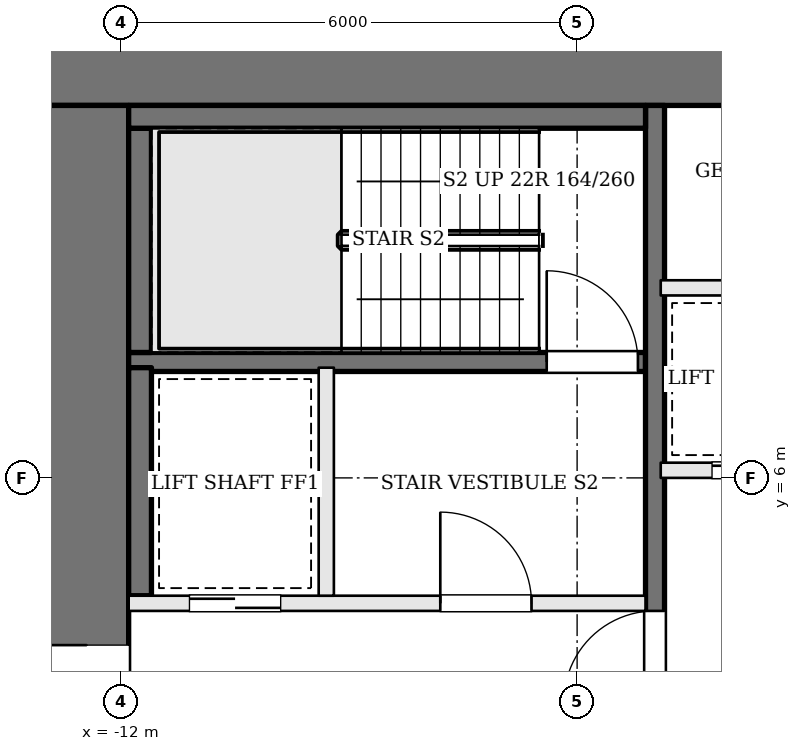
"""IFC4 building model, lengths in metres.
Left out: names, types, materials, properties, quantities, classifications, styles, units other than length and angle.
Written with IfcOpenShell. Run it as: python <this file> out.ifc"""

import sys

from ifc_helpers import new_model, si_unit, direction, frame, frame_2d, origin, place, context, subcontext, project, spatial, rectangle, extrude, element, fill, save


model = new_model("IFC4")
c1 = context("Model", 3, precision=1e-05, world=origin(), true_north=direction((0.0, 1.0)))
c2 = subcontext(c1, "Body", "Model", "MODEL_VIEW")
j1 = project(units=[si_unit("LENGTHUNIT", "METRE"), si_unit("PLANEANGLEUNIT", "RADIAN")], contexts=[c1])
p1 = place(None, origin())
s1 = spatial("IfcSite", under=j1, at=p1, CompositionType="ELEMENT")
p2 = place(p1, origin())
s2 = spatial("IfcBuilding", under=s1, at=p2, CompositionType="ELEMENT")
p3 = place(p2, frame((0.0, 0.0, 114.0)))
s3 = spatial("IfcBuildingStorey", under=s2, at=p3, CompositionType="ELEMENT", Elevation=114.0)
p4 = place(p3, frame((-13.0, 11.45, 0.0), z_axis=(0.0, 0.0, 1.0), x_axis=(1.0, 0.0, 0.0)))
e1 = element("IfcWall", 1, at=p4, inside=s3, PredefinedType="SHEAR", context=c2, shape_type="SweptSolid", body=[
    extrude(rectangle(XDim=26.0, YDim=1.1, at=frame_2d((13.0, 0.0))), origin(), (0.0, 0.0, 1.0), 3.6),
])
p5 = place(p4, frame((9.225, 0.0, 0.0)))
e2 = element("IfcOpeningElement", 2, at=p5, cuts=e1, PredefinedType="OPENING", context=c2, shape_type="SweptSolid", body=[
    extrude(rectangle(XDim=1.0, YDim=2.1, at=frame_2d((0.5, 1.05))), frame((0.0, 0.56, 0.0), z_axis=(0.0, -1.0, 0.0), x_axis=(1.0, 0.0, 0.0)), (0.0, 0.0, 1.0), 1.12),
])
p6 = place(p4, frame((11.825, 0.0, 0.0)))
e3 = element("IfcOpeningElement", 3, at=p6, cuts=e1, PredefinedType="OPENING", context=c2, shape_type="SweptSolid", body=[
    extrude(rectangle(XDim=0.7, YDim=2.1, at=frame_2d((0.35, 1.05))), frame((0.0, 0.56, 0.0), z_axis=(0.0, -1.0, 0.0), x_axis=(1.0, 0.0, 0.0)), (0.0, 0.0, 1.0), 1.12),
])
p7 = place(p4, frame((13.725, 0.0, 0.0)))
e4 = element("IfcOpeningElement", 4, at=p7, cuts=e1, PredefinedType="OPENING", context=c2, shape_type="SweptSolid", body=[
    extrude(rectangle(XDim=1.0, YDim=2.1, at=frame_2d((0.5, 1.05))), frame((0.0, 0.56, 0.0), z_axis=(0.0, -1.0, 0.0), x_axis=(1.0, 0.0, 0.0)), (0.0, 0.0, 1.0), 1.12),
])
p8 = place(p4, frame((16.225, 0.0, 0.0)))
e5 = element("IfcOpeningElement", 5, at=p8, cuts=e1, PredefinedType="OPENING", context=c2, shape_type="SweptSolid", body=[
    extrude(rectangle(XDim=0.9, YDim=2.1, at=frame_2d((0.45, 1.05))), frame((0.0, 0.56, 0.0), z_axis=(0.0, -1.0, 0.0), x_axis=(1.0, 0.0, 0.0)), (0.0, 0.0, 1.0), 1.12),
])
p9 = place(p3, frame((-12.45, -1.9, 0.0), z_axis=(0.0, 0.0, 1.0), x_axis=(0.0, 1.0, 0.0)))
e6 = element("IfcWall", 6, at=p9, inside=s3, PredefinedType="SHEAR", context=c2, shape_type="SweptSolid", body=[
    extrude(rectangle(XDim=12.8, YDim=1.1, at=frame_2d((6.4, 0.0))), origin(), (0.0, 0.0, 1.0), 3.6),
])
p10 = place(p9, frame((3.9, 0.0, 0.0)))
e7 = element("IfcOpeningElement", 7, at=p10, cuts=e6, PredefinedType="OPENING", context=c2, shape_type="SweptSolid", body=[
    extrude(rectangle(XDim=1.8, YDim=2.1, at=frame_2d((0.9, 1.05))), frame((0.0, 0.56, 0.0), z_axis=(0.0, -1.0, 0.0), x_axis=(1.0, 0.0, 0.0)), (0.0, 0.0, 1.0), 1.12),
])
p11 = place(p3, frame((-11.9, 4.35, 0.0), z_axis=(0.0, 0.0, 1.0), x_axis=(1.0, 0.0, 0.0)))
e8 = element("IfcWall", 8, at=p11, inside=s3, PredefinedType="SOLIDWALL", context=c2, shape_type="SweptSolid", body=[
    extrude(rectangle(XDim=6.8, YDim=0.2, at=frame_2d((3.4, 0.0))), origin(), (0.0, 0.0, 1.0), 3.4),
])
p12 = place(p11, frame((4.1, 0.0, 0.0)))
e9 = element("IfcOpeningElement", 9, at=p12, cuts=e8, PredefinedType="OPENING", context=c2, shape_type="SweptSolid", body=[
    extrude(rectangle(XDim=1.2, YDim=2.1, at=frame_2d((0.6, 1.05))), frame((0.0, 0.11, 0.0), z_axis=(0.0, -1.0, 0.0), x_axis=(1.0, 0.0, 0.0)), (0.0, 0.0, 1.0), 0.22),
])
p13 = place(p11, frame((0.8, 0.0, 0.0)))
e10 = element("IfcOpeningElement", 10, at=p13, cuts=e8, PredefinedType="OPENING", context=c2, shape_type="SweptSolid", body=[
    extrude(rectangle(XDim=1.2, YDim=2.1, at=frame_2d((0.6, 1.05))), frame((0.0, 0.11, 0.0), z_axis=(0.0, -1.0, 0.0), x_axis=(1.0, 0.0, 0.0)), (0.0, 0.0, 1.0), 0.22),
])
p14 = place(p3, frame((-11.9, 7.525, 0.0), z_axis=(0.0, 0.0, 1.0), x_axis=(1.0, 0.0, 0.0)))
e11 = element("IfcWall", 11, at=p14, inside=s3, PredefinedType="SOLIDWALL", context=c2, shape_type="SweptSolid", body=[
    extrude(rectangle(XDim=6.8, YDim=0.25, at=frame_2d((3.4, 0.0))), origin(), (0.0, 0.0, 1.0), 3.4),
])
p15 = place(p14, frame((5.5, 0.0, 0.0)))
e12 = element("IfcOpeningElement", 12, at=p15, cuts=e11, PredefinedType="OPENING", context=c2, shape_type="SweptSolid", body=[
    extrude(rectangle(XDim=1.2, YDim=2.1, at=frame_2d((0.6, 1.05))), frame((0.0, 0.135, 0.0), z_axis=(0.0, -1.0, 0.0), x_axis=(1.0, 0.0, 0.0)), (0.0, 0.0, 1.0), 0.27),
])
p16 = place(p3, frame((-9.3, 4.45, 0.0), z_axis=(0.0, 0.0, 1.0), x_axis=(0.0, 1.0, 0.0)))
e13 = element("IfcWall", 13, at=p16, inside=s3, PredefinedType="SOLIDWALL", context=c2, shape_type="SweptSolid", body=[
    extrude(rectangle(XDim=3.0, YDim=0.2, at=frame_2d((1.5, 0.0))), origin(), (0.0, 0.0, 1.0), 3.4),
])
p17 = place(p3, frame((-4.975, -1.9, 0.0), z_axis=(0.0, 0.0, 1.0), x_axis=(0.0, 1.0, 0.0)))
e14 = element("IfcWall", 14, at=p17, inside=s3, PredefinedType="SOLIDWALL", context=c2, shape_type="SweptSolid", body=[
    extrude(rectangle(XDim=12.8, YDim=0.25, at=frame_2d((6.4, 0.0))), origin(), (0.0, 0.0, 1.0), 3.4),
])
p18 = place(p17, frame((4.95, 0.0, 0.0)))
e15 = element("IfcOpeningElement", 15, at=p18, cuts=e14, PredefinedType="OPENING", context=c2, shape_type="SweptSolid", body=[
    extrude(rectangle(XDim=1.2, YDim=2.1, at=frame_2d((0.6, 1.05))), frame((0.0, 0.135, 0.0), z_axis=(0.0, -1.0, 0.0), x_axis=(1.0, 0.0, 0.0)), (0.0, 0.0, 1.0), 0.27),
])
p19 = place(p3, frame((-11.75, 4.45, 0.0), z_axis=(0.0, 0.0, 1.0), x_axis=(0.0, 1.0, 0.0)))
e16 = element("IfcWall", 16, at=p19, inside=s3, PredefinedType="SOLIDWALL", context=c2, shape_type="SweptSolid", body=[
    extrude(rectangle(XDim=3.0, YDim=0.3, at=frame_2d((1.5, 0.0))), origin(), (0.0, 0.0, 1.0), 3.4),
])
p20 = place(p3, frame((-11.75, 7.65, 0.0), z_axis=(0.0, 0.0, 1.0), x_axis=(0.0, 1.0, 0.0)))
e17 = element("IfcWall", 17, at=p20, inside=s3, PredefinedType="SOLIDWALL", context=c2, shape_type="SweptSolid", body=[
    extrude(rectangle(XDim=2.95, YDim=0.3, at=frame_2d((1.475, 0.0))), origin(), (0.0, 0.0, 1.0), 3.4),
])
p21 = place(p3, frame((-11.9, 10.75, 0.0), z_axis=(0.0, 0.0, 1.0), x_axis=(1.0, 0.0, 0.0)))
e18 = element("IfcWall", 18, at=p21, inside=s3, PredefinedType="SOLIDWALL", context=c2, shape_type="SweptSolid", body=[
    extrude(rectangle(XDim=6.8, YDim=0.3, at=frame_2d((3.4, 0.0))), origin(), (0.0, 0.0, 1.0), 3.4),
])
p22 = place(p3, frame((-4.9, 6.1, 0.0), z_axis=(0.0, 0.0, 1.0), x_axis=(1.0, 0.0, 0.0)))
e19 = element("IfcWall", 19, at=p22, inside=s3, PredefinedType="SOLIDWALL", context=c2, shape_type="SweptSolid", body=[
    extrude(rectangle(XDim=9.8, YDim=0.2, at=frame_2d((4.9, 0.0))), origin(), (0.0, 0.0, 1.0), 3.4),
])
p23 = place(p22, frame((0.675, 0.0, 0.0)))
e20 = element("IfcOpeningElement", 20, at=p23, cuts=e19, PredefinedType="OPENING", context=c2, shape_type="SweptSolid", body=[
    extrude(rectangle(XDim=1.1, YDim=2.1, at=frame_2d((0.55, 1.05))), frame((0.0, 0.11, 0.0), z_axis=(0.0, -1.0, 0.0), x_axis=(1.0, 0.0, 0.0)), (0.0, 0.0, 1.0), 0.22),
])
p24 = place(p22, frame((3.125, 0.0, 0.0)))
e21 = element("IfcOpeningElement", 21, at=p24, cuts=e19, PredefinedType="OPENING", context=c2, shape_type="SweptSolid", body=[
    extrude(rectangle(XDim=1.1, YDim=2.1, at=frame_2d((0.55, 1.05))), frame((0.0, 0.11, 0.0), z_axis=(0.0, -1.0, 0.0), x_axis=(1.0, 0.0, 0.0)), (0.0, 0.0, 1.0), 0.22),
])
p25 = place(p22, frame((5.575, 0.0, 0.0)))
e22 = element("IfcOpeningElement", 22, at=p25, cuts=e19, PredefinedType="OPENING", context=c2, shape_type="SweptSolid", body=[
    extrude(rectangle(XDim=1.1, YDim=2.1, at=frame_2d((0.55, 1.05))), frame((0.0, 0.11, 0.0), z_axis=(0.0, -1.0, 0.0), x_axis=(1.0, 0.0, 0.0)), (0.0, 0.0, 1.0), 0.22),
])
p26 = place(p22, frame((8.025, 0.0, 0.0)))
e23 = element("IfcOpeningElement", 23, at=p26, cuts=e19, PredefinedType="OPENING", context=c2, shape_type="SweptSolid", body=[
    extrude(rectangle(XDim=1.1, YDim=2.1, at=frame_2d((0.55, 1.05))), frame((0.0, 0.11, 0.0), z_axis=(0.0, -1.0, 0.0), x_axis=(1.0, 0.0, 0.0)), (0.0, 0.0, 1.0), 0.22),
])
p27 = place(p3, frame((-4.9, 8.5, 0.0), z_axis=(0.0, 0.0, 1.0), x_axis=(1.0, 0.0, 0.0)))
e24 = element("IfcWall", 24, at=p27, inside=s3, PredefinedType="SOLIDWALL", context=c2, shape_type="SweptSolid", body=[
    extrude(rectangle(XDim=9.8, YDim=0.2, at=frame_2d((4.9, 0.0))), origin(), (0.0, 0.0, 1.0), 3.4),
])
p28 = place(p10, origin())
e25 = element("IfcDoor", 25, at=p28, inside=s3, OperationType="DOUBLE_DOOR_SINGLE_SWING", PredefinedType="DOOR", context=c2, shape_type="SweptSolid", body=[
    extrude(rectangle(XDim=1.8, YDim=2.1, at=frame_2d((0.9, 1.05))), frame((0.0, 0.025, 0.0), z_axis=(0.0, -1.0, 0.0), x_axis=(1.0, 0.0, 0.0)), (0.0, 0.0, 1.0), 0.05),
])
fill(e7, e25)
p29 = place(p18, origin())
e26 = element("IfcDoor", 26, at=p29, inside=s3, OperationType="SINGLE_SWING_LEFT", PredefinedType="DOOR", context=c2, shape_type="SweptSolid", body=[
    extrude(rectangle(XDim=1.2, YDim=2.1, at=frame_2d((0.6, 1.05))), frame((0.0, 0.025, 0.0), z_axis=(0.0, -1.0, 0.0), x_axis=(1.0, 0.0, 0.0)), (0.0, 0.0, 1.0), 0.05),
])
fill(e15, e26)
p30 = place(p12, origin())
e27 = element("IfcDoor", 27, at=p30, inside=s3, OperationType="SINGLE_SWING_LEFT", PredefinedType="DOOR", context=c2, shape_type="SweptSolid", body=[
    extrude(rectangle(XDim=1.2, YDim=2.1, at=frame_2d((0.6, 1.05))), frame((0.0, 0.025, 0.0), z_axis=(0.0, -1.0, 0.0), x_axis=(1.0, 0.0, 0.0)), (0.0, 0.0, 1.0), 0.05),
])
fill(e9, e27)
p31 = place(p15, origin())
e28 = element("IfcDoor", 28, at=p31, inside=s3, OperationType="SINGLE_SWING_LEFT", PredefinedType="DOOR", context=c2, shape_type="SweptSolid", body=[
    extrude(rectangle(XDim=1.2, YDim=2.1, at=frame_2d((0.6, 1.05))), frame((0.0, 0.025, 0.0), z_axis=(0.0, -1.0, 0.0), x_axis=(1.0, 0.0, 0.0)), (0.0, 0.0, 1.0), 0.05),
])
fill(e12, e28)
p32 = place(p13, origin())
e29 = element("IfcDoor", 29, at=p32, inside=s3, OperationType="SLIDING_TO_RIGHT", PredefinedType="DOOR", context=c2, shape_type="SweptSolid", body=[
    extrude(rectangle(XDim=1.2, YDim=2.1, at=frame_2d((0.6, 1.05))), frame((0.0, 0.025, 0.0), z_axis=(0.0, -1.0, 0.0), x_axis=(1.0, 0.0, 0.0)), (0.0, 0.0, 1.0), 0.05),
])
fill(e10, e29)
p33 = place(p23, origin())
e30 = element("IfcDoor", 30, at=p33, inside=s3, OperationType="SLIDING_TO_RIGHT", PredefinedType="DOOR", context=c2, shape_type="SweptSolid", body=[
    extrude(rectangle(XDim=1.1, YDim=2.1, at=frame_2d((0.55, 1.05))), frame((0.0, 0.025, 0.0), z_axis=(0.0, -1.0, 0.0), x_axis=(1.0, 0.0, 0.0)), (0.0, 0.0, 1.0), 0.05),
])
fill(e20, e30)
save(model, sys.argv[1])
